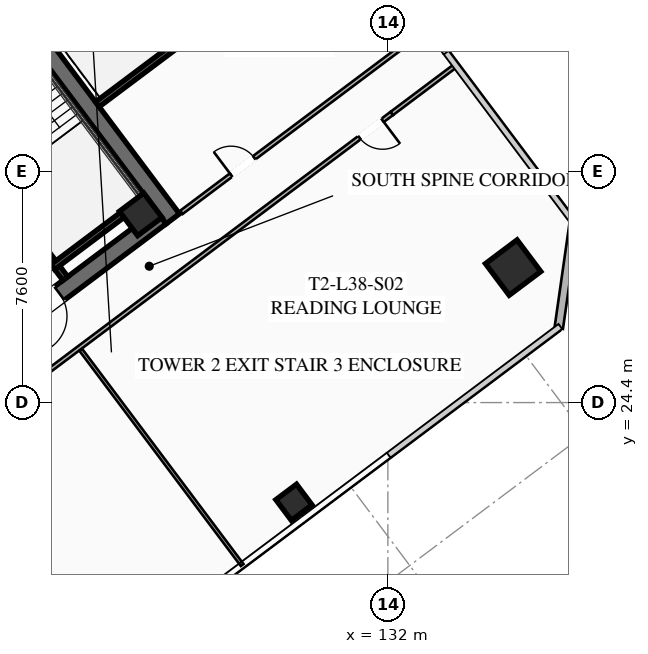
"""IFC4 building model, lengths in metres.
Left out: names, types, materials, properties, quantities, classifications, styles, units other than length and angle.
Written with IfcOpenShell. Run it as: python <this file> out.ifc"""

import sys

from ifc_helpers import new_model, si_unit, direction, frame, frame_2d, origin, origin_2d, place, context, subcontext, project, spatial, rectangle, hollow_rectangle, extrude, element, fill, save


model = new_model("IFC4")
c1 = context("Model", 3, precision=1e-05, world=origin(), true_north=direction((0.0, 1.0)))
c2 = subcontext(c1, "Body", "Model", "MODEL_VIEW")
j1 = project(units=[si_unit("LENGTHUNIT", "METRE"), si_unit("PLANEANGLEUNIT", "RADIAN")], contexts=[c1])
p1 = place(None, origin())
s1 = spatial("IfcSite", under=j1, at=p1, CompositionType="ELEMENT")
p2 = place(p1, origin())
s2 = spatial("IfcBuilding", under=s1, at=p2, CompositionType="ELEMENT")
p3 = place(p2, frame((0.0, 0.0, 142.8)))
s3 = spatial("IfcBuildingStorey", under=s2, at=p3, CompositionType="ELEMENT", Elevation=142.8)
p4 = place(p3, frame((115.564, 42.923, 0.0), z_axis=(0.0, 0.0, 1.0), x_axis=(0.600005007985, -0.799996243986, 0.0)))
e1 = element("IfcWall", 1, at=p4, inside=s3, PredefinedType="SHEAR", context=c2, shape_type="SweptSolid", body=[
    extrude(rectangle(XDim=15.6, YDim=0.55, at=frame_2d((7.8, 0.0))), origin(), (0.0, 0.0, 1.0), 3.55),
])
p5 = place(p3, frame((124.539, 30.498, 0.0), z_axis=(0.0, 0.0, 1.0), x_axis=(-0.799998054672, -0.600002593761, 0.0)))
e2 = element("IfcWall", 2, at=p5, inside=s3, PredefinedType="SHEAR", context=c2, shape_type="SweptSolid", body=[
    extrude(rectangle(XDim=15.06, YDim=0.55, at=frame_2d((7.53, 0.0))), origin(), (0.0, 0.0, 1.0), 3.55),
])
p6 = place(p5, frame((9.23, 0.0, 0.0)))
e3 = element("IfcOpeningElement", 3, at=p6, cuts=e2, PredefinedType="OPENING", context=c2, shape_type="SweptSolid", body=[
    extrude(rectangle(XDim=1.25, YDim=2.25, at=frame_2d((0.625, 1.125))), frame((0.0, 0.285, 0.0), z_axis=(0.0, -1.0, 0.0), x_axis=(1.0, 0.0, 0.0)), (0.0, 0.0, 1.0), 0.57),
])
p7 = place(p5, frame((4.18, 0.0, 0.0)))
e4 = element("IfcOpeningElement", 4, at=p7, cuts=e2, PredefinedType="OPENING", context=c2, shape_type="SweptSolid", body=[
    extrude(rectangle(XDim=1.25, YDim=2.25, at=frame_2d((0.625, 1.125))), frame((0.0, 0.285, 0.0), z_axis=(0.0, -1.0, 0.0), x_axis=(1.0, 0.0, 0.0)), (0.0, 0.0, 1.0), 0.57),
])
p8 = place(p3, frame((123.87, 30.59, 0.0), z_axis=(0.0, 0.0, 1.0), x_axis=(0.799999996291, 0.600000004945, 0.0)))
e5 = element("IfcColumn", 5, at=p8, inside=s3, PredefinedType="COLUMN", context=c2, shape_type="SweptSolid", body=[
    extrude(hollow_rectangle(XDim=1.0, YDim=1.0, WallThickness=0.04, at=origin_2d()), origin(), (0.0, 0.0, 1.0), 3.37),
])
p9 = place(p3, frame((136.12, 28.84, 0.0), z_axis=(0.0, 0.0, 1.0), x_axis=(0.799999996291, 0.600000004945, 0.0)))
e6 = element("IfcColumn", 6, at=p9, inside=s3, PredefinedType="COLUMN", context=c2, shape_type="SweptSolid", body=[
    extrude(hollow_rectangle(XDim=1.3, YDim=1.3, WallThickness=0.05, at=origin_2d()), origin(), (0.0, 0.0, 1.0), 3.37),
])
p10 = place(p3, frame((128.91, 21.12, 0.0), z_axis=(0.0, 0.0, 1.0), x_axis=(0.799999996291, 0.600000004945, 0.0)))
e7 = element("IfcColumn", 7, at=p10, inside=s3, PredefinedType="COLUMN", context=c2, shape_type="SweptSolid", body=[
    extrude(hollow_rectangle(XDim=0.85, YDim=0.85, WallThickness=0.035, at=origin_2d()), origin(), (0.0, 0.0, 1.0), 3.37),
])
p11 = place(p3, frame((138.12, 30.34, 0.0), z_axis=(0.0, 0.0, 1.0), x_axis=(-0.141421356237, -0.989949493661, 0.0)))
e8 = element("IfcWall", 8, at=p11, inside=s3, PredefinedType="SOLIDWALL", context=c2, shape_type="SweptSolid", body=[
    extrude(rectangle(XDim=3.536, YDim=0.28, at=frame_2d((1.768, 0.0))), origin(), (0.0, 0.0, 1.0), 3.37),
])
p12 = place(p3, frame((116.56, 34.92, 0.0), z_axis=(0.0, 0.0, 1.0), x_axis=(0.59999029481, -0.8000072788, 0.0)))
e9 = element("IfcWall", 9, at=p12, inside=s3, PredefinedType="SHEAR", context=c2, shape_type="SweptSolid", body=[
    extrude(rectangle(XDim=8.05, YDim=0.2, at=frame_2d((4.025, 0.0))), origin(), (0.0, 0.0, 1.0), 3.37),
])
p13 = place(p12, frame((0.45, 0.0, 0.0)))
e10 = element("IfcOpeningElement", 10, at=p13, cuts=e9, PredefinedType="OPENING", context=c2, shape_type="SweptSolid", body=[
    extrude(rectangle(XDim=1.15, YDim=2.2, at=frame_2d((0.575, 1.1))), frame((0.0, 0.11, 0.0), z_axis=(0.0, -1.0, 0.0), x_axis=(1.0, 0.0, 0.0)), (0.0, 0.0, 1.0), 0.22),
])
p14 = place(p3, frame((120.98, 28.86, 0.0), z_axis=(0.0, 0.0, 1.0), x_axis=(0.800015298837, 0.599979601008, 0.0)))
e11 = element("IfcWall", 11, at=p14, inside=s3, PredefinedType="SHEAR", context=c2, shape_type="SweptSolid", body=[
    extrude(rectangle(XDim=3.83, YDim=0.2, at=frame_2d((1.915, 0.0))), origin(), (0.0, 0.0, 1.0), 3.37),
])
p15 = place(p3, frame((122.444, 34.208, 0.0), z_axis=(0.0, 0.0, 1.0), x_axis=(0.79999138319, 0.600011488909, 0.0)))
e12 = element("IfcWall", 12, at=p15, inside=s3, PredefinedType="SHEAR", context=c2, shape_type="SweptSolid", body=[
    extrude(rectangle(XDim=3.4, YDim=0.2, at=frame_2d((1.7, 0.0))), origin(), (0.0, 0.0, 1.0), 3.37),
])
p16 = place(p3, frame((132.13, 33.91, 0.0), z_axis=(0.0, 0.0, 1.0), x_axis=(-0.799997191971, -0.600003744021, 0.0)))
e13 = element("IfcWall", 13, at=p16, inside=s3, PredefinedType="PARTITIONING", context=c2, shape_type="SweptSolid", body=[
    extrude(rectangle(XDim=31.3, YDim=0.135, at=frame_2d((15.65, 0.0))), origin(), (0.0, 0.0, 1.0), 2.723),
])
p17 = place(p16, frame((29.97, 0.0, 0.0)))
e14 = element("IfcOpeningElement", 14, at=p17, cuts=e13, PredefinedType="OPENING", context=c2, shape_type="SweptSolid", body=[
    extrude(rectangle(XDim=0.95, YDim=2.05, at=frame_2d((0.475, 1.025))), frame((0.0, 0.077, 0.0), z_axis=(0.0, -1.0, 0.0), x_axis=(1.0, 0.0, 0.0)), (0.0, 0.0, 1.0), 0.155),
])
p18 = place(p16, frame((0.38, 0.0, 0.0)))
e15 = element("IfcOpeningElement", 15, at=p18, cuts=e13, PredefinedType="OPENING", context=c2, shape_type="SweptSolid", body=[
    extrude(rectangle(XDim=0.95, YDim=2.05, at=frame_2d((0.475, 1.025))), frame((0.0, 0.077, 0.0), z_axis=(0.0, -1.0, 0.0), x_axis=(1.0, 0.0, 0.0)), (0.0, 0.0, 1.0), 0.155),
])
p19 = place(p3, frame((132.13, 33.91, 0.0), z_axis=(0.0, 0.0, 1.0), x_axis=(0.799977721118, 0.600029704027, 0.0)))
e16 = element("IfcWall", 16, at=p19, inside=s3, PredefinedType="PARTITIONING", context=c2, shape_type="SweptSolid", body=[
    extrude(rectangle(XDim=2.63, YDim=0.135, at=frame_2d((1.315, 0.0))), origin(), (0.0, 0.0, 1.0), 2.723),
])
p20 = place(p3, frame((127.208, 19.056, 0.0), z_axis=(0.0, 0.0, 1.0), x_axis=(-0.6, 0.8, 0.0)))
e17 = element("IfcWall", 17, at=p20, inside=s3, PredefinedType="PARTITIONING", context=c2, shape_type="SweptSolid", body=[
    extrude(rectangle(XDim=8.85, YDim=0.11, at=frame_2d((4.425, 0.0))), origin(), (0.0, 0.0, 1.0), 2.723),
])
p21 = place(p3, frame((125.208, 30.656, 0.0), z_axis=(0.0, 0.0, 1.0), x_axis=(0.799997105034, 0.600003859935, 0.0)))
e18 = element("IfcWall", 18, at=p21, inside=s3, PredefinedType="PARTITIONING", context=c2, shape_type="SweptSolid", body=[
    extrude(rectangle(XDim=10.12, YDim=0.135, at=frame_2d((5.06, 0.0))), origin(), (0.0, 0.0, 1.0), 2.723),
])
p22 = place(p21, frame((2.045, 0.0, 0.0)))
e19 = element("IfcOpeningElement", 19, at=p22, cuts=e18, PredefinedType="OPENING", context=c2, shape_type="SweptSolid", body=[
    extrude(rectangle(XDim=0.95, YDim=2.05, at=frame_2d((0.475, 1.025))), frame((0.0, 0.077, 0.0), z_axis=(0.0, -1.0, 0.0), x_axis=(1.0, 0.0, 0.0)), (0.0, 0.0, 1.0), 0.155),
])
p23 = place(p7, origin())
e20 = element("IfcDoor", 20, at=p23, inside=s3, OperationType="SINGLE_SWING_RIGHT", PredefinedType="DOOR", context=c2, shape_type="SweptSolid", body=[
    extrude(rectangle(XDim=1.25, YDim=2.25, at=frame_2d((0.625, 1.125))), frame((0.0, 0.025, 0.0), z_axis=(0.0, -1.0, 0.0), x_axis=(1.0, 0.0, 0.0)), (0.0, 0.0, 1.0), 0.05),
])
fill(e4, e20)
p24 = place(p18, origin())
e21 = element("IfcDoor", 21, at=p24, inside=s3, OperationType="SINGLE_SWING_LEFT", PredefinedType="DOOR", context=c2, shape_type="SweptSolid", body=[
    extrude(rectangle(XDim=0.95, YDim=2.05, at=frame_2d((0.475, 1.025))), frame((0.0, 0.025, 0.0), z_axis=(0.0, -1.0, 0.0), x_axis=(1.0, 0.0, 0.0)), (0.0, 0.0, 1.0), 0.05),
])
fill(e15, e21)
p25 = place(p22, origin())
e22 = element("IfcDoor", 22, at=p25, inside=s3, OperationType="SINGLE_SWING_LEFT", PredefinedType="DOOR", context=c2, shape_type="SweptSolid", body=[
    extrude(rectangle(XDim=0.95, YDim=2.05, at=frame_2d((0.475, 1.025))), frame((0.0, 0.025, 0.0), z_axis=(0.0, -1.0, 0.0), x_axis=(1.0, 0.0, 0.0)), (0.0, 0.0, 1.0), 0.05),
])
fill(e19, e22)
save(model, sys.argv[1])
